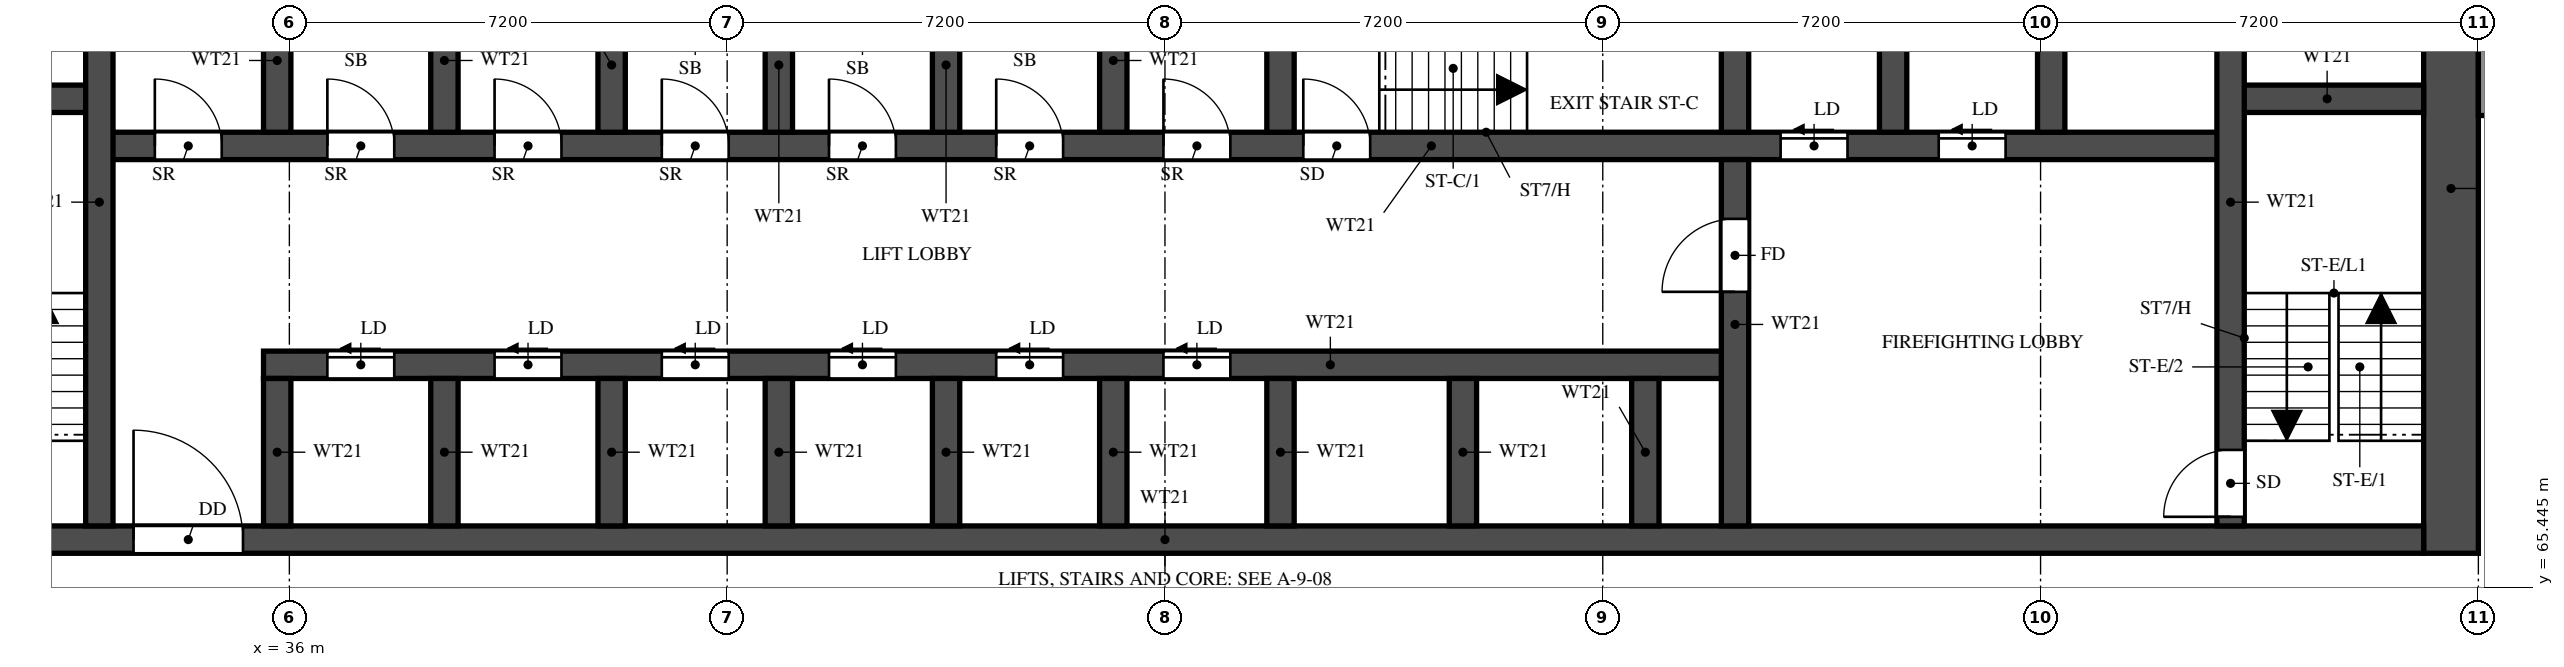
"""IFC4 building model, lengths in metres.
Left out: names, types, materials, properties, quantities, classifications, styles, units other than length and angle.
Written with IfcOpenShell. Run it as: python <this file> out.ifc"""

import sys

from ifc_helpers import new_model, si_unit, direction, frame, frame_2d, origin, place, context, subcontext, project, spatial, rectangle, extrude, element, fill, save


model = new_model("IFC4")
c1 = context("Model", 3, precision=1e-05, world=origin(), true_north=direction((0.0, 1.0)))
c2 = subcontext(c1, "Body", "Model", "MODEL_VIEW")
j1 = project(units=[si_unit("LENGTHUNIT", "METRE"), si_unit("PLANEANGLEUNIT", "RADIAN")], contexts=[c1])
p1 = place(None, origin())
s1 = spatial("IfcSite", under=j1, at=p1, CompositionType="ELEMENT")
p2 = place(p1, origin())
s2 = spatial("IfcBuilding", under=s1, at=p2, CompositionType="ELEMENT")
p3 = place(p2, frame((0.0, 0.0, 30.5)))
s3 = spatial("IfcBuildingStorey", under=s2, at=p3, CompositionType="ELEMENT", Elevation=30.5)
p4 = place(p3, frame((71.55, 66.0, 0.0), z_axis=(0.0, 0.0, 1.0), x_axis=(0.0, 1.0, 0.0)))
e1 = element("IfcWall", 1, at=p4, inside=s3, PredefinedType="SHEAR", context=c2, shape_type="SweptSolid", body=[
    extrude(rectangle(XDim=12.0, YDim=0.9, at=frame_2d((6.0, 0.0))), origin(), (0.0, 0.0, 1.0), 3.18),
])
p5 = place(p3, frame((29.7, 66.225, 0.0), z_axis=(0.0, 0.0, 1.0), x_axis=(1.0, 0.0, 0.0)))
e2 = element("IfcWall", 2, at=p5, inside=s3, PredefinedType="SHEAR", context=c2, shape_type="SweptSolid", body=[
    extrude(rectangle(XDim=41.4, YDim=0.45, at=frame_2d((20.7, 0.0))), origin(), (0.0, 0.0, 1.0), 3.18),
])
p6 = place(p5, frame((0.925, 0.0, 0.0)))
e3 = element("IfcOpeningElement", 3, at=p6, cuts=e2, PredefinedType="OPENING", context=c2, shape_type="SweptSolid", body=[
    extrude(rectangle(XDim=1.1, YDim=2.1, at=frame_2d((0.55, 1.05))), frame((0.0, 0.235, 0.0), z_axis=(0.0, -1.0, 0.0), x_axis=(1.0, 0.0, 0.0)), (0.0, 0.0, 1.0), 0.47),
])
p7 = place(p5, frame((3.738, 0.0, 0.0)))
e4 = element("IfcOpeningElement", 4, at=p7, cuts=e2, PredefinedType="OPENING", context=c2, shape_type="SweptSolid", body=[
    extrude(rectangle(XDim=1.8, YDim=2.1, at=frame_2d((0.9, 1.05))), frame((0.0, 0.235, 0.0), z_axis=(0.0, -1.0, 0.0), x_axis=(1.0, 0.0, 0.0)), (0.0, 0.0, 1.0), 0.47),
])
p8 = place(p3, frame((35.575, 69.1, 0.0), z_axis=(0.0, 0.0, 1.0), x_axis=(1.0, 0.0, 0.0)))
e5 = element("IfcWall", 5, at=p8, inside=s3, PredefinedType="SHEAR", context=c2, shape_type="SweptSolid", body=[
    extrude(rectangle(XDim=24.2, YDim=0.45, at=frame_2d((12.1, 0.0))), origin(), (0.0, 0.0, 1.0), 3.18),
])
p9 = place(p8, frame((1.05, 0.0, 0.0)))
e6 = element("IfcOpeningElement", 6, at=p9, cuts=e5, PredefinedType="OPENING", context=c2, shape_type="SweptSolid", body=[
    extrude(rectangle(XDim=1.1, YDim=2.1, at=frame_2d((0.55, 1.05))), frame((0.0, 0.235, 0.0), z_axis=(0.0, -1.0, 0.0), x_axis=(1.0, 0.0, 0.0)), (0.0, 0.0, 1.0), 0.47),
])
p10 = place(p8, frame((3.8, 0.0, 0.0)))
e7 = element("IfcOpeningElement", 7, at=p10, cuts=e5, PredefinedType="OPENING", context=c2, shape_type="SweptSolid", body=[
    extrude(rectangle(XDim=1.1, YDim=2.1, at=frame_2d((0.55, 1.05))), frame((0.0, 0.235, 0.0), z_axis=(0.0, -1.0, 0.0), x_axis=(1.0, 0.0, 0.0)), (0.0, 0.0, 1.0), 0.47),
])
p11 = place(p8, frame((6.55, 0.0, 0.0)))
e8 = element("IfcOpeningElement", 8, at=p11, cuts=e5, PredefinedType="OPENING", context=c2, shape_type="SweptSolid", body=[
    extrude(rectangle(XDim=1.1, YDim=2.1, at=frame_2d((0.55, 1.05))), frame((0.0, 0.235, 0.0), z_axis=(0.0, -1.0, 0.0), x_axis=(1.0, 0.0, 0.0)), (0.0, 0.0, 1.0), 0.47),
])
p12 = place(p8, frame((9.3, 0.0, 0.0)))
e9 = element("IfcOpeningElement", 9, at=p12, cuts=e5, PredefinedType="OPENING", context=c2, shape_type="SweptSolid", body=[
    extrude(rectangle(XDim=1.1, YDim=2.1, at=frame_2d((0.55, 1.05))), frame((0.0, 0.235, 0.0), z_axis=(0.0, -1.0, 0.0), x_axis=(1.0, 0.0, 0.0)), (0.0, 0.0, 1.0), 0.47),
])
p13 = place(p8, frame((12.05, 0.0, 0.0)))
e10 = element("IfcOpeningElement", 10, at=p13, cuts=e5, PredefinedType="OPENING", context=c2, shape_type="SweptSolid", body=[
    extrude(rectangle(XDim=1.1, YDim=2.1, at=frame_2d((0.55, 1.05))), frame((0.0, 0.235, 0.0), z_axis=(0.0, -1.0, 0.0), x_axis=(1.0, 0.0, 0.0)), (0.0, 0.0, 1.0), 0.47),
])
p14 = place(p8, frame((14.8, 0.0, 0.0)))
e11 = element("IfcOpeningElement", 11, at=p14, cuts=e5, PredefinedType="OPENING", context=c2, shape_type="SweptSolid", body=[
    extrude(rectangle(XDim=1.1, YDim=2.1, at=frame_2d((0.55, 1.05))), frame((0.0, 0.235, 0.0), z_axis=(0.0, -1.0, 0.0), x_axis=(1.0, 0.0, 0.0)), (0.0, 0.0, 1.0), 0.47),
])
p15 = place(p3, frame((32.875, 72.7, 0.0), z_axis=(0.0, 0.0, 1.0), x_axis=(1.0, 0.0, 0.0)))
e12 = element("IfcWall", 12, at=p15, inside=s3, PredefinedType="SHEAR", context=c2, shape_type="SweptSolid", body=[
    extrude(rectangle(XDim=35.05, YDim=0.45, at=frame_2d((17.525, 0.0))), origin(), (0.0, 0.0, 1.0), 3.18),
])
p16 = place(p15, frame((19.8, 0.0, 0.0)))
e13 = element("IfcOpeningElement", 13, at=p16, cuts=e12, PredefinedType="OPENING", context=c2, shape_type="SweptSolid", body=[
    extrude(rectangle(XDim=1.1, YDim=2.1, at=frame_2d((0.55, 1.05))), frame((0.0, 0.235, 0.0), z_axis=(0.0, -1.0, 0.0), x_axis=(1.0, 0.0, 0.0)), (0.0, 0.0, 1.0), 0.47),
])
p17 = place(p15, frame((27.65, 0.0, 0.0)))
e14 = element("IfcOpeningElement", 14, at=p17, cuts=e12, PredefinedType="OPENING", context=c2, shape_type="SweptSolid", body=[
    extrude(rectangle(XDim=1.1, YDim=2.1, at=frame_2d((0.55, 1.05))), frame((0.0, 0.235, 0.0), z_axis=(0.0, -1.0, 0.0), x_axis=(1.0, 0.0, 0.0)), (0.0, 0.0, 1.0), 0.47),
])
p18 = place(p15, frame((30.25, 0.0, 0.0)))
e15 = element("IfcOpeningElement", 15, at=p18, cuts=e12, PredefinedType="OPENING", context=c2, shape_type="SweptSolid", body=[
    extrude(rectangle(XDim=1.1, YDim=2.1, at=frame_2d((0.55, 1.05))), frame((0.0, 0.235, 0.0), z_axis=(0.0, -1.0, 0.0), x_axis=(1.0, 0.0, 0.0)), (0.0, 0.0, 1.0), 0.47),
])
p19 = place(p15, frame((3.75, 0.0, 0.0)))
e16 = element("IfcOpeningElement", 16, at=p19, cuts=e12, PredefinedType="OPENING", context=c2, shape_type="SweptSolid", body=[
    extrude(rectangle(XDim=1.1, YDim=2.1, at=frame_2d((0.55, 1.05))), frame((0.0, 0.235, 0.0), z_axis=(0.0, -1.0, 0.0), x_axis=(1.0, 0.0, 0.0)), (0.0, 0.0, 1.0), 0.47),
])
p20 = place(p15, frame((6.5, 0.0, 0.0)))
e17 = element("IfcOpeningElement", 17, at=p20, cuts=e12, PredefinedType="OPENING", context=c2, shape_type="SweptSolid", body=[
    extrude(rectangle(XDim=1.1, YDim=2.1, at=frame_2d((0.55, 1.05))), frame((0.0, 0.235, 0.0), z_axis=(0.0, -1.0, 0.0), x_axis=(1.0, 0.0, 0.0)), (0.0, 0.0, 1.0), 0.47),
])
p21 = place(p15, frame((9.25, 0.0, 0.0)))
e18 = element("IfcOpeningElement", 18, at=p21, cuts=e12, PredefinedType="OPENING", context=c2, shape_type="SweptSolid", body=[
    extrude(rectangle(XDim=1.1, YDim=2.1, at=frame_2d((0.55, 1.05))), frame((0.0, 0.235, 0.0), z_axis=(0.0, -1.0, 0.0), x_axis=(1.0, 0.0, 0.0)), (0.0, 0.0, 1.0), 0.47),
])
p22 = place(p15, frame((12.0, 0.0, 0.0)))
e19 = element("IfcOpeningElement", 19, at=p22, cuts=e12, PredefinedType="OPENING", context=c2, shape_type="SweptSolid", body=[
    extrude(rectangle(XDim=1.1, YDim=2.1, at=frame_2d((0.55, 1.05))), frame((0.0, 0.235, 0.0), z_axis=(0.0, -1.0, 0.0), x_axis=(1.0, 0.0, 0.0)), (0.0, 0.0, 1.0), 0.47),
])
p23 = place(p15, frame((14.75, 0.0, 0.0)))
e20 = element("IfcOpeningElement", 20, at=p23, cuts=e12, PredefinedType="OPENING", context=c2, shape_type="SweptSolid", body=[
    extrude(rectangle(XDim=1.1, YDim=2.1, at=frame_2d((0.55, 1.05))), frame((0.0, 0.235, 0.0), z_axis=(0.0, -1.0, 0.0), x_axis=(1.0, 0.0, 0.0)), (0.0, 0.0, 1.0), 0.47),
])
p24 = place(p15, frame((17.5, 0.0, 0.0)))
e21 = element("IfcOpeningElement", 21, at=p24, cuts=e12, PredefinedType="OPENING", context=c2, shape_type="SweptSolid", body=[
    extrude(rectangle(XDim=1.1, YDim=2.1, at=frame_2d((0.55, 1.05))), frame((0.0, 0.235, 0.0), z_axis=(0.0, -1.0, 0.0), x_axis=(1.0, 0.0, 0.0)), (0.0, 0.0, 1.0), 0.47),
])
p25 = place(p15, frame((0.913, 0.0, 0.0)))
e22 = element("IfcOpeningElement", 22, at=p25, cuts=e12, PredefinedType="OPENING", context=c2, shape_type="SweptSolid", body=[
    extrude(rectangle(XDim=1.1, YDim=2.1, at=frame_2d((0.55, 1.05))), frame((0.0, 0.235, 0.0), z_axis=(0.0, -1.0, 0.0), x_axis=(1.0, 0.0, 0.0)), (0.0, 0.0, 1.0), 0.47),
])
for number, where, z_axis, x_axis in (
    (23, (29.7, 73.475, 0.0), (0.0, 0.0, 1.0), (1.0, 0.0, 0.0)),
    (24, (67.925, 73.475, 0.0), (0.0, 0.0, 1.0), (1.0, 0.0, 0.0)),
):
    element("IfcWall", number, at=place(p3, frame(where, z_axis=z_axis, x_axis=x_axis)), inside=s3, PredefinedType="SHEAR", context=c2, shape_type="SweptSolid", body=[
        extrude(rectangle(XDim=3.175, YDim=0.45, at=frame_2d((1.587, 0.0))), origin(), (0.0, 0.0, 1.0), 3.18),
    ])
p26 = place(p3, frame((32.875, 66.45, 0.0), z_axis=(0.0, 0.0, 1.0), x_axis=(0.0, 1.0, 0.0)))
e25 = element("IfcWall", 25, at=p26, inside=s3, PredefinedType="SHEAR", context=c2, shape_type="SweptSolid", body=[
    extrude(rectangle(XDim=10.65, YDim=0.45, at=frame_2d((5.325, 0.0))), origin(), (0.0, 0.0, 1.0), 3.18),
])
p27 = place(p3, frame((67.925, 66.45, 0.0), z_axis=(0.0, 0.0, 1.0), x_axis=(0.0, 1.0, 0.0)))
e26 = element("IfcWall", 26, at=p27, inside=s3, PredefinedType="SHEAR", context=c2, shape_type="SweptSolid", body=[
    extrude(rectangle(XDim=10.65, YDim=0.45, at=frame_2d((5.325, 0.0))), origin(), (0.0, 0.0, 1.0), 3.18),
])
p28 = place(p27, frame((0.15, 0.0, 0.0)))
e27 = element("IfcOpeningElement", 27, at=p28, cuts=e26, PredefinedType="OPENING", context=c2, shape_type="SweptSolid", body=[
    extrude(rectangle(XDim=1.1, YDim=2.1, at=frame_2d((0.55, 1.05))), frame((0.0, 0.235, 0.0), z_axis=(0.0, -1.0, 0.0), x_axis=(1.0, 0.0, 0.0)), (0.0, 0.0, 1.0), 0.47),
])
p29 = place(p3, frame((59.775, 66.45, 0.0), z_axis=(0.0, 0.0, 1.0), x_axis=(0.0, 1.0, 0.0)))
e28 = element("IfcWall", 28, at=p29, inside=s3, PredefinedType="SHEAR", context=c2, shape_type="SweptSolid", body=[
    extrude(rectangle(XDim=6.025, YDim=0.45, at=frame_2d((3.013, 0.0))), origin(), (0.0, 0.0, 1.0), 3.18),
])
p30 = place(p29, frame((3.85, 0.0, 0.0)))
e29 = element("IfcOpeningElement", 29, at=p30, cuts=e28, PredefinedType="OPENING", context=c2, shape_type="SweptSolid", body=[
    extrude(rectangle(XDim=1.2, YDim=2.1, at=frame_2d((0.6, 1.05))), frame((0.0, 0.235, 0.0), z_axis=(0.0, -1.0, 0.0), x_axis=(1.0, 0.0, 0.0)), (0.0, 0.0, 1.0), 0.47),
])
p31 = place(p3, frame((59.775, 72.925, 0.0), z_axis=(0.0, 0.0, 1.0), x_axis=(0.0, 1.0, 0.0)))
e30 = element("IfcWall", 30, at=p31, inside=s3, PredefinedType="SHEAR", context=c2, shape_type="SweptSolid", body=[
    extrude(rectangle(XDim=2.95, YDim=0.45, at=frame_2d((1.475, 0.0))), origin(), (0.0, 0.0, 1.0), 3.18),
])
for number, where, z_axis, x_axis in (
    (31, (35.8, 66.45, 0.0), (0.0, 0.0, 1.0), (0.0, 1.0, 0.0)),
    (32, (38.55, 66.45, 0.0), (0.0, 0.0, 1.0), (0.0, 1.0, 0.0)),
    (33, (41.3, 66.45, 0.0), (0.0, 0.0, 1.0), (0.0, 1.0, 0.0)),
    (34, (44.05, 66.45, 0.0), (0.0, 0.0, 1.0), (0.0, 1.0, 0.0)),
    (35, (46.8, 66.45, 0.0), (0.0, 0.0, 1.0), (0.0, 1.0, 0.0)),
    (36, (49.55, 66.45, 0.0), (0.0, 0.0, 1.0), (0.0, 1.0, 0.0)),
    (37, (52.3, 66.45, 0.0), (0.0, 0.0, 1.0), (0.0, 1.0, 0.0)),
    (38, (55.3, 66.45, 0.0), (0.0, 0.0, 1.0), (0.0, 1.0, 0.0)),
    (39, (58.3, 66.45, 0.0), (0.0, 0.0, 1.0), (0.0, 1.0, 0.0)),
):
    element("IfcWall", number, at=place(p3, frame(where, z_axis=z_axis, x_axis=x_axis)), inside=s3, PredefinedType="SHEAR", context=c2, shape_type="SweptSolid", body=[
        extrude(rectangle(XDim=2.425, YDim=0.45, at=frame_2d((1.212, 0.0))), origin(), (0.0, 0.0, 1.0), 3.18),
    ])
for number, where, z_axis, x_axis in (
    (40, (35.8, 72.925, 0.0), (0.0, 0.0, 1.0), (0.0, 1.0, 0.0)),
    (41, (38.55, 72.925, 0.0), (0.0, 0.0, 1.0), (0.0, 1.0, 0.0)),
    (42, (41.3, 72.925, 0.0), (0.0, 0.0, 1.0), (0.0, 1.0, 0.0)),
    (43, (44.05, 72.925, 0.0), (0.0, 0.0, 1.0), (0.0, 1.0, 0.0)),
    (44, (46.8, 72.925, 0.0), (0.0, 0.0, 1.0), (0.0, 1.0, 0.0)),
    (45, (49.55, 72.925, 0.0), (0.0, 0.0, 1.0), (0.0, 1.0, 0.0)),
    (46, (52.3, 72.925, 0.0), (0.0, 0.0, 1.0), (0.0, 1.0, 0.0)),
    (47, (62.375, 72.925, 0.0), (0.0, 0.0, 1.0), (0.0, 1.0, 0.0)),
    (48, (64.975, 72.925, 0.0), (0.0, 0.0, 1.0), (0.0, 1.0, 0.0)),
):
    element("IfcWall", number, at=place(p3, frame(where, z_axis=z_axis, x_axis=x_axis)), inside=s3, PredefinedType="SHEAR", context=c2, shape_type="SweptSolid", body=[
        extrude(rectangle(XDim=2.95, YDim=0.45, at=frame_2d((1.475, 0.0))), origin(), (0.0, 0.0, 1.0), 3.18),
    ])
p32 = place(p3, frame((72.1, 73.2, 0.0), z_axis=(0.0, 0.0, 1.0), x_axis=(0.0, 1.0, 0.0)))
e49 = element("IfcWall", 49, at=p32, inside=s3, PredefinedType="SOLIDWALL", context=c2, shape_type="SweptSolid", body=[
    extrude(rectangle(XDim=4.8, YDim=0.2, at=frame_2d((2.4, 0.0))), origin(), (0.0, 0.0, 1.0), 3.18),
])
p33 = place(p16, origin())
e50 = element("IfcDoor", 50, at=p33, inside=s3, OperationType="SINGLE_SWING_LEFT", PredefinedType="DOOR", context=c2, shape_type="SweptSolid", body=[
    extrude(rectangle(XDim=1.1, YDim=2.1, at=frame_2d((0.55, 1.05))), frame((0.0, 0.025, 0.0), z_axis=(0.0, -1.0, 0.0), x_axis=(1.0, 0.0, 0.0)), (0.0, 0.0, 1.0), 0.05),
])
fill(e13, e50)
p34 = place(p28, origin())
e51 = element("IfcDoor", 51, at=p34, inside=s3, OperationType="SINGLE_SWING_LEFT", PredefinedType="DOOR", context=c2, shape_type="SweptSolid", body=[
    extrude(rectangle(XDim=1.1, YDim=2.1, at=frame_2d((0.55, 1.05))), frame((0.0, 0.025, 0.0), z_axis=(0.0, -1.0, 0.0), x_axis=(1.0, 0.0, 0.0)), (0.0, 0.0, 1.0), 0.05),
])
fill(e27, e51)
p35 = place(p7, origin())
e52 = element("IfcDoor", 52, at=p35, inside=s3, OperationType="DOUBLE_DOOR_SINGLE_SWING", PredefinedType="DOOR", context=c2, shape_type="SweptSolid", body=[
    extrude(rectangle(XDim=1.8, YDim=2.1, at=frame_2d((0.9, 1.05))), frame((0.0, 0.025, 0.0), z_axis=(0.0, -1.0, 0.0), x_axis=(1.0, 0.0, 0.0)), (0.0, 0.0, 1.0), 0.05),
])
fill(e4, e52)
p36 = place(p30, origin())
e53 = element("IfcDoor", 53, at=p36, inside=s3, OperationType="SINGLE_SWING_RIGHT", PredefinedType="DOOR", context=c2, shape_type="SweptSolid", body=[
    extrude(rectangle(XDim=1.2, YDim=2.1, at=frame_2d((0.6, 1.05))), frame((0.0, 0.025, 0.0), z_axis=(0.0, -1.0, 0.0), x_axis=(1.0, 0.0, 0.0)), (0.0, 0.0, 1.0), 0.05),
])
fill(e29, e53)
p37 = place(p17, origin())
e54 = element("IfcDoor", 54, at=p37, inside=s3, OperationType="SLIDING_TO_LEFT", PredefinedType="DOOR", context=c2, shape_type="SweptSolid", body=[
    extrude(rectangle(XDim=1.1, YDim=2.1, at=frame_2d((0.55, 1.05))), frame((0.0, 0.025, 0.0), z_axis=(0.0, -1.0, 0.0), x_axis=(1.0, 0.0, 0.0)), (0.0, 0.0, 1.0), 0.05),
])
fill(e14, e54)
p38 = place(p18, origin())
e55 = element("IfcDoor", 55, at=p38, inside=s3, OperationType="SLIDING_TO_LEFT", PredefinedType="DOOR", context=c2, shape_type="SweptSolid", body=[
    extrude(rectangle(XDim=1.1, YDim=2.1, at=frame_2d((0.55, 1.05))), frame((0.0, 0.025, 0.0), z_axis=(0.0, -1.0, 0.0), x_axis=(1.0, 0.0, 0.0)), (0.0, 0.0, 1.0), 0.05),
])
fill(e15, e55)
p39 = place(p9, origin())
e56 = element("IfcDoor", 56, at=p39, inside=s3, OperationType="SLIDING_TO_LEFT", PredefinedType="DOOR", context=c2, shape_type="SweptSolid", body=[
    extrude(rectangle(XDim=1.1, YDim=2.1, at=frame_2d((0.55, 1.05))), frame((0.0, 0.025, 0.0), z_axis=(0.0, -1.0, 0.0), x_axis=(1.0, 0.0, 0.0)), (0.0, 0.0, 1.0), 0.05),
])
fill(e6, e56)
p40 = place(p10, origin())
e57 = element("IfcDoor", 57, at=p40, inside=s3, OperationType="SLIDING_TO_LEFT", PredefinedType="DOOR", context=c2, shape_type="SweptSolid", body=[
    extrude(rectangle(XDim=1.1, YDim=2.1, at=frame_2d((0.55, 1.05))), frame((0.0, 0.025, 0.0), z_axis=(0.0, -1.0, 0.0), x_axis=(1.0, 0.0, 0.0)), (0.0, 0.0, 1.0), 0.05),
])
fill(e7, e57)
p41 = place(p11, origin())
e58 = element("IfcDoor", 58, at=p41, inside=s3, OperationType="SLIDING_TO_LEFT", PredefinedType="DOOR", context=c2, shape_type="SweptSolid", body=[
    extrude(rectangle(XDim=1.1, YDim=2.1, at=frame_2d((0.55, 1.05))), frame((0.0, 0.025, 0.0), z_axis=(0.0, -1.0, 0.0), x_axis=(1.0, 0.0, 0.0)), (0.0, 0.0, 1.0), 0.05),
])
fill(e8, e58)
p42 = place(p12, origin())
e59 = element("IfcDoor", 59, at=p42, inside=s3, OperationType="SLIDING_TO_LEFT", PredefinedType="DOOR", context=c2, shape_type="SweptSolid", body=[
    extrude(rectangle(XDim=1.1, YDim=2.1, at=frame_2d((0.55, 1.05))), frame((0.0, 0.025, 0.0), z_axis=(0.0, -1.0, 0.0), x_axis=(1.0, 0.0, 0.0)), (0.0, 0.0, 1.0), 0.05),
])
fill(e9, e59)
p43 = place(p13, origin())
e60 = element("IfcDoor", 60, at=p43, inside=s3, OperationType="SLIDING_TO_LEFT", PredefinedType="DOOR", context=c2, shape_type="SweptSolid", body=[
    extrude(rectangle(XDim=1.1, YDim=2.1, at=frame_2d((0.55, 1.05))), frame((0.0, 0.025, 0.0), z_axis=(0.0, -1.0, 0.0), x_axis=(1.0, 0.0, 0.0)), (0.0, 0.0, 1.0), 0.05),
])
fill(e10, e60)
p44 = place(p14, origin())
e61 = element("IfcDoor", 61, at=p44, inside=s3, OperationType="SLIDING_TO_LEFT", PredefinedType="DOOR", context=c2, shape_type="SweptSolid", body=[
    extrude(rectangle(XDim=1.1, YDim=2.1, at=frame_2d((0.55, 1.05))), frame((0.0, 0.025, 0.0), z_axis=(0.0, -1.0, 0.0), x_axis=(1.0, 0.0, 0.0)), (0.0, 0.0, 1.0), 0.05),
])
fill(e11, e61)
p45 = place(p19, origin())
e62 = element("IfcDoor", 62, at=p45, inside=s3, OperationType="SINGLE_SWING_LEFT", PredefinedType="DOOR", context=c2, shape_type="SweptSolid", body=[
    extrude(rectangle(XDim=1.1, YDim=2.1, at=frame_2d((0.55, 1.05))), frame((0.0, 0.025, 0.0), z_axis=(0.0, -1.0, 0.0), x_axis=(1.0, 0.0, 0.0)), (0.0, 0.0, 1.0), 0.05),
])
fill(e16, e62)
p46 = place(p20, origin())
e63 = element("IfcDoor", 63, at=p46, inside=s3, OperationType="SINGLE_SWING_LEFT", PredefinedType="DOOR", context=c2, shape_type="SweptSolid", body=[
    extrude(rectangle(XDim=1.1, YDim=2.1, at=frame_2d((0.55, 1.05))), frame((0.0, 0.025, 0.0), z_axis=(0.0, -1.0, 0.0), x_axis=(1.0, 0.0, 0.0)), (0.0, 0.0, 1.0), 0.05),
])
fill(e17, e63)
p47 = place(p21, origin())
e64 = element("IfcDoor", 64, at=p47, inside=s3, OperationType="SINGLE_SWING_LEFT", PredefinedType="DOOR", context=c2, shape_type="SweptSolid", body=[
    extrude(rectangle(XDim=1.1, YDim=2.1, at=frame_2d((0.55, 1.05))), frame((0.0, 0.025, 0.0), z_axis=(0.0, -1.0, 0.0), x_axis=(1.0, 0.0, 0.0)), (0.0, 0.0, 1.0), 0.05),
])
fill(e18, e64)
p48 = place(p22, origin())
e65 = element("IfcDoor", 65, at=p48, inside=s3, OperationType="SINGLE_SWING_LEFT", PredefinedType="DOOR", context=c2, shape_type="SweptSolid", body=[
    extrude(rectangle(XDim=1.1, YDim=2.1, at=frame_2d((0.55, 1.05))), frame((0.0, 0.025, 0.0), z_axis=(0.0, -1.0, 0.0), x_axis=(1.0, 0.0, 0.0)), (0.0, 0.0, 1.0), 0.05),
])
fill(e19, e65)
p49 = place(p23, origin())
e66 = element("IfcDoor", 66, at=p49, inside=s3, OperationType="SINGLE_SWING_LEFT", PredefinedType="DOOR", context=c2, shape_type="SweptSolid", body=[
    extrude(rectangle(XDim=1.1, YDim=2.1, at=frame_2d((0.55, 1.05))), frame((0.0, 0.025, 0.0), z_axis=(0.0, -1.0, 0.0), x_axis=(1.0, 0.0, 0.0)), (0.0, 0.0, 1.0), 0.05),
])
fill(e20, e66)
p50 = place(p24, origin())
e67 = element("IfcDoor", 67, at=p50, inside=s3, OperationType="SINGLE_SWING_LEFT", PredefinedType="DOOR", context=c2, shape_type="SweptSolid", body=[
    extrude(rectangle(XDim=1.1, YDim=2.1, at=frame_2d((0.55, 1.05))), frame((0.0, 0.025, 0.0), z_axis=(0.0, -1.0, 0.0), x_axis=(1.0, 0.0, 0.0)), (0.0, 0.0, 1.0), 0.05),
])
fill(e21, e67)
p51 = place(p25, origin())
e68 = element("IfcDoor", 68, at=p51, inside=s3, OperationType="SINGLE_SWING_LEFT", PredefinedType="DOOR", context=c2, shape_type="SweptSolid", body=[
    extrude(rectangle(XDim=1.1, YDim=2.1, at=frame_2d((0.55, 1.05))), frame((0.0, 0.025, 0.0), z_axis=(0.0, -1.0, 0.0), x_axis=(1.0, 0.0, 0.0)), (0.0, 0.0, 1.0), 0.05),
])
fill(e22, e68)
save(model, sys.argv[1])
